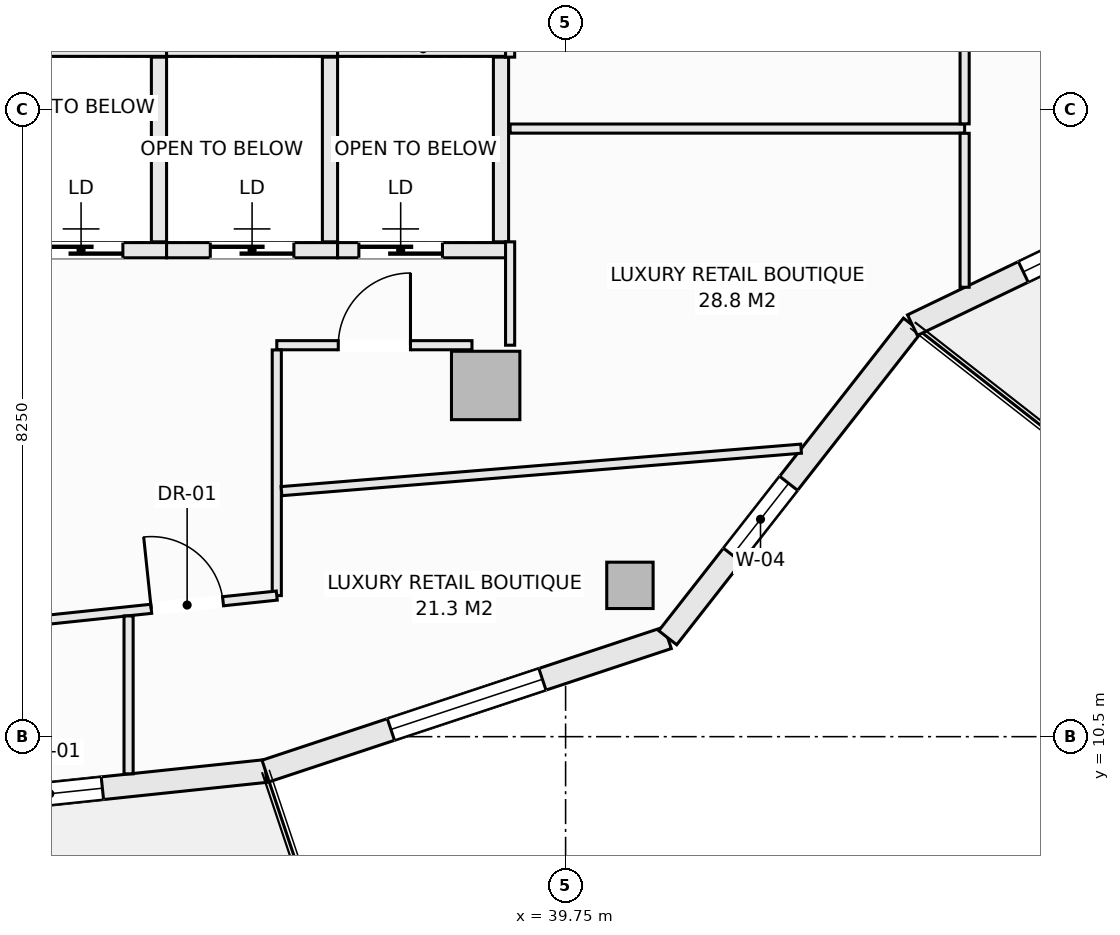
"""IFC4 building model, lengths in metres.
Left out: names, types, materials, properties, quantities, classifications, styles, units other than length and angle.
Written with IfcOpenShell. Run it as: python <this file> out.ifc"""

import sys

from ifc_helpers import new_model, si_unit, direction, frame, frame_2d, origin, origin_2d, place, context, subcontext, project, spatial, rectangle, hollow_rectangle, extrude, element, fill, save


model = new_model("IFC4")
c1 = context("Model", 3, precision=1e-05, world=origin(), true_north=direction((0.0, 1.0)))
c2 = subcontext(c1, "Body", "Model", "MODEL_VIEW")
j1 = project(units=[si_unit("LENGTHUNIT", "METRE"), si_unit("PLANEANGLEUNIT", "RADIAN")], contexts=[c1])
p1 = place(None, origin())
s1 = spatial("IfcSite", under=j1, at=p1, CompositionType="ELEMENT")
p2 = place(p1, origin())
s2 = spatial("IfcBuilding", under=s1, at=p2, CompositionType="ELEMENT")
p3 = place(p2, frame((0.0, 0.0, 166.5)))
s3 = spatial("IfcBuildingStorey", under=s2, at=p3, CompositionType="ELEMENT", Elevation=166.5)
p4 = place(p3, frame((40.596, 12.49, -0.27), z_axis=(0.0, 0.0, 1.0), x_axis=(1.0, 0.0, 0.0)))
e1 = element("IfcColumn", 1, at=p4, inside=s3, PredefinedType="COLUMN", context=c2, shape_type="SweptSolid", body=[
    extrude(hollow_rectangle(XDim=0.61, YDim=0.61, WallThickness=0.025, at=origin_2d()), origin(), (0.0, 0.0, 1.0), 3.4),
])
p5 = place(p3, frame((38.698, 15.121, -0.27), z_axis=(0.0, 0.0, 1.0), x_axis=(1.0, 0.0, 0.0)))
e2 = element("IfcColumn", 2, at=p5, inside=s3, PredefinedType="COLUMN", context=c2, shape_type="SweptSolid", body=[
    extrude(rectangle(XDim=0.9, YDim=0.9, at=origin_2d()), origin(), (0.0, 0.0, 1.0), 3.4),
])
p6 = place(p3, frame((30.125, 9.45, 0.0), z_axis=(0.0, 0.0, 1.0), x_axis=(0.994496545245, 0.104769372887, 0.0)))
e3 = element("IfcWall", 3, at=p6, inside=s3, PredefinedType="SOLIDWALL", context=c2, shape_type="SweptSolid", body=[
    extrude(rectangle(XDim=5.709, YDim=0.3, at=frame_2d((2.854, 0.0))), origin(), (0.0, 0.0, 1.0), 2.653),
])
p7 = place(p6, frame((1.45, 0.0, 0.74)))
e4 = element("IfcOpeningElement", 4, at=p7, cuts=e3, PredefinedType="OPENING", context=c2, shape_type="SweptSolid", body=[
    extrude(rectangle(XDim=2.1, YDim=1.7, at=frame_2d((1.05, 0.85))), frame((0.0, 0.16, 0.0), z_axis=(0.0, -1.0, 0.0), x_axis=(1.0, 0.0, 0.0)), (0.0, 0.0, 1.0), 0.32),
])
p8 = place(p3, frame((35.803, 10.048, 0.0), z_axis=(0.0, 0.0, 1.0), x_axis=(0.949246811547, 0.314532177636, 0.0)))
e5 = element("IfcWall", 5, at=p8, inside=s3, PredefinedType="SOLIDWALL", context=c2, shape_type="SweptSolid", body=[
    extrude(rectangle(XDim=5.574, YDim=0.3, at=frame_2d((2.787, 0.0))), origin(), (0.0, 0.0, 1.0), 2.653),
])
p9 = place(p8, frame((1.737, 0.0, 0.74)))
e6 = element("IfcOpeningElement", 6, at=p9, cuts=e5, PredefinedType="OPENING", context=c2, shape_type="SweptSolid", body=[
    extrude(rectangle(XDim=2.1, YDim=1.7, at=frame_2d((1.05, 0.85))), frame((0.0, 0.16, 0.0), z_axis=(0.0, -1.0, 0.0), x_axis=(1.0, 0.0, 0.0)), (0.0, 0.0, 1.0), 0.32),
])
p10 = place(p3, frame((41.094, 11.801, 0.0), z_axis=(0.0, 0.0, 1.0), x_axis=(0.616429245738, 0.787410302828, 0.0)))
e7 = element("IfcWall", 7, at=p10, inside=s3, PredefinedType="SOLIDWALL", context=c2, shape_type="SweptSolid", body=[
    extrude(rectangle(XDim=5.223, YDim=0.3, at=frame_2d((2.612, 0.0))), origin(), (0.0, 0.0, 1.0), 2.653),
])
p11 = place(p10, frame((1.38, 0.0, 0.72)))
e8 = element("IfcOpeningElement", 8, at=p11, cuts=e7, PredefinedType="OPENING", context=c2, shape_type="SweptSolid", body=[
    extrude(rectangle(XDim=1.2, YDim=1.65, at=frame_2d((0.6, 0.825))), frame((0.0, 0.16, 0.0), z_axis=(0.0, -1.0, 0.0), x_axis=(1.0, 0.0, 0.0)), (0.0, 0.0, 1.0), 0.32),
])
p12 = place(p3, frame((44.313, 15.914, 0.0), z_axis=(0.0, 0.0, 1.0), x_axis=(0.901353070301, 0.433085029363, 0.0)))
e9 = element("IfcWall", 9, at=p12, inside=s3, PredefinedType="SOLIDWALL", context=c2, shape_type="SweptSolid", body=[
    extrude(rectangle(XDim=5.336, YDim=0.3, at=frame_2d((2.668, 0.0))), origin(), (0.0, 0.0, 1.0), 2.653),
])
p13 = place(p12, frame((1.618, 0.0, 0.74)))
e10 = element("IfcOpeningElement", 10, at=p13, cuts=e9, PredefinedType="OPENING", context=c2, shape_type="SweptSolid", body=[
    extrude(rectangle(XDim=2.1, YDim=1.7, at=frame_2d((1.05, 0.85))), frame((0.0, 0.16, 0.0), z_axis=(0.0, -1.0, 0.0), x_axis=(1.0, 0.0, 0.0)), (0.0, 0.0, 1.0), 0.32),
])
p14 = place(p3, frame((32.25, 19.55, 0.0), z_axis=(0.0, 0.0, 1.0), x_axis=(1.0, 0.0, 0.0)))
e11 = element("IfcWall", 11, at=p14, inside=s3, PredefinedType="SOLIDWALL", context=c2, shape_type="SweptSolid", body=[
    extrude(rectangle(XDim=2.25, YDim=0.2, at=frame_2d((1.125, 0.0))), origin(), (0.0, 0.0, 1.0), 3.13),
])
p15 = place(p3, frame((32.25, 16.9, 0.0), z_axis=(0.0, 0.0, 1.0), x_axis=(1.0, 0.0, 0.0)))
e12 = element("IfcWall", 12, at=p15, inside=s3, PredefinedType="SOLIDWALL", context=c2, shape_type="SweptSolid", body=[
    extrude(rectangle(XDim=2.25, YDim=0.2, at=frame_2d((1.125, 0.0))), origin(), (0.0, 0.0, 1.0), 3.13),
])
p16 = place(p15, frame((0.575, 0.0, 0.0)))
e13 = element("IfcOpeningElement", 13, at=p16, cuts=e12, PredefinedType="OPENING", context=c2, shape_type="SweptSolid", body=[
    extrude(rectangle(XDim=1.1, YDim=2.2, at=frame_2d((0.55, 1.1))), frame((0.0, 0.11, 0.0), z_axis=(0.0, -1.0, 0.0), x_axis=(1.0, 0.0, 0.0)), (0.0, 0.0, 1.0), 0.22),
])
p17 = place(p3, frame((34.4, 17.01, 0.0), z_axis=(0.0, 0.0, 1.0), x_axis=(0.0, 1.0, 0.0)))
e14 = element("IfcWall", 14, at=p17, inside=s3, PredefinedType="SOLIDWALL", context=c2, shape_type="SweptSolid", body=[
    extrude(rectangle(XDim=2.43, YDim=0.2, at=frame_2d((1.215, 0.0))), origin(), (0.0, 0.0, 1.0), 3.13),
])
p18 = place(p3, frame((34.5, 19.55, 0.0), z_axis=(0.0, 0.0, 1.0), x_axis=(1.0, 0.0, 0.0)))
e15 = element("IfcWall", 15, at=p18, inside=s3, PredefinedType="SOLIDWALL", context=c2, shape_type="SweptSolid", body=[
    extrude(rectangle(XDim=2.25, YDim=0.2, at=frame_2d((1.125, 0.0))), origin(), (0.0, 0.0, 1.0), 3.13),
])
p19 = place(p3, frame((34.5, 16.9, 0.0), z_axis=(0.0, 0.0, 1.0), x_axis=(1.0, 0.0, 0.0)))
e16 = element("IfcWall", 16, at=p19, inside=s3, PredefinedType="SOLIDWALL", context=c2, shape_type="SweptSolid", body=[
    extrude(rectangle(XDim=2.25, YDim=0.2, at=frame_2d((1.125, 0.0))), origin(), (0.0, 0.0, 1.0), 3.13),
])
p20 = place(p19, frame((0.575, 0.0, 0.0)))
e17 = element("IfcOpeningElement", 17, at=p20, cuts=e16, PredefinedType="OPENING", context=c2, shape_type="SweptSolid", body=[
    extrude(rectangle(XDim=1.1, YDim=2.2, at=frame_2d((0.55, 1.1))), frame((0.0, 0.11, 0.0), z_axis=(0.0, -1.0, 0.0), x_axis=(1.0, 0.0, 0.0)), (0.0, 0.0, 1.0), 0.22),
])
p21 = place(p3, frame((36.65, 17.01, 0.0), z_axis=(0.0, 0.0, 1.0), x_axis=(0.0, 1.0, 0.0)))
e18 = element("IfcWall", 18, at=p21, inside=s3, PredefinedType="SOLIDWALL", context=c2, shape_type="SweptSolid", body=[
    extrude(rectangle(XDim=2.43, YDim=0.2, at=frame_2d((1.215, 0.0))), origin(), (0.0, 0.0, 1.0), 3.13),
])
p22 = place(p3, frame((36.75, 19.55, 0.0), z_axis=(0.0, 0.0, 1.0), x_axis=(1.0, 0.0, 0.0)))
e19 = element("IfcWall", 19, at=p22, inside=s3, PredefinedType="SOLIDWALL", context=c2, shape_type="SweptSolid", body=[
    extrude(rectangle(XDim=2.25, YDim=0.2, at=frame_2d((1.125, 0.0))), origin(), (0.0, 0.0, 1.0), 3.13),
])
p23 = place(p3, frame((36.75, 16.9, 0.0), z_axis=(0.0, 0.0, 1.0), x_axis=(1.0, 0.0, 0.0)))
e20 = element("IfcWall", 20, at=p23, inside=s3, PredefinedType="SOLIDWALL", context=c2, shape_type="SweptSolid", body=[
    extrude(rectangle(XDim=2.25, YDim=0.2, at=frame_2d((1.125, 0.0))), origin(), (0.0, 0.0, 1.0), 3.13),
])
p24 = place(p23, frame((0.28, 0.0, 0.0)))
e21 = element("IfcOpeningElement", 21, at=p24, cuts=e20, PredefinedType="OPENING", context=c2, shape_type="SweptSolid", body=[
    extrude(rectangle(XDim=1.1, YDim=2.2, at=frame_2d((0.55, 1.1))), frame((0.0, 0.11, 0.0), z_axis=(0.0, -1.0, 0.0), x_axis=(1.0, 0.0, 0.0)), (0.0, 0.0, 1.0), 0.22),
])
p25 = place(p3, frame((38.9, 17.01, 0.0), z_axis=(0.0, 0.0, 1.0), x_axis=(0.0, 1.0, 0.0)))
e22 = element("IfcWall", 22, at=p25, inside=s3, PredefinedType="SOLIDWALL", context=c2, shape_type="SweptSolid", body=[
    extrude(rectangle(XDim=2.43, YDim=0.2, at=frame_2d((1.215, 0.0))), origin(), (0.0, 0.0, 1.0), 3.13),
])
p26 = place(p3, frame((39.02, 15.65, 0.0), z_axis=(0.0, 0.0, 1.0), x_axis=(0.0, 1.0, 0.0)))
e23 = element("IfcWall", 23, at=p26, inside=s3, PredefinedType="PARTITIONING", context=c2, shape_type="SweptSolid", body=[
    extrude(rectangle(XDim=1.36, YDim=0.12, at=frame_2d((0.68, 0.0))), origin(), (0.0, 0.0, 1.0), 2.505),
])
p27 = place(p3, frame((39.02, 19.44, 0.0), z_axis=(0.0, 0.0, 1.0), x_axis=(0.0, 1.0, 0.0)))
e24 = element("IfcWall", 24, at=p27, inside=s3, PredefinedType="PARTITIONING", context=c2, shape_type="SweptSolid", body=[
    extrude(rectangle(XDim=0.92, YDim=0.12, at=frame_2d((0.46, 0.0))), origin(), (0.0, 0.0, 1.0), 3.13),
])
p28 = place(p3, frame((35.95, 15.65, 0.0), z_axis=(0.0, 0.0, 1.0), x_axis=(1.0, 0.0, 0.0)))
e25 = element("IfcWall", 25, at=p28, inside=s3, PredefinedType="PARTITIONING", context=c2, shape_type="SweptSolid", body=[
    extrude(rectangle(XDim=2.568, YDim=0.12, at=frame_2d((1.284, 0.0))), origin(), (0.0, 0.0, 1.0), 3.13),
])
p29 = place(p28, frame((0.809, 0.0, 0.0)))
e26 = element("IfcOpeningElement", 26, at=p29, cuts=e25, PredefinedType="OPENING", context=c2, shape_type="SweptSolid", body=[
    extrude(rectangle(XDim=0.95, YDim=2.1, at=frame_2d((0.475, 1.05))), frame((0.0, 0.07, 0.0), z_axis=(0.0, -1.0, 0.0), x_axis=(1.0, 0.0, 0.0)), (0.0, 0.0, 1.0), 0.14),
])
p30 = place(p3, frame((35.95, 12.356, 0.0), z_axis=(0.0, 0.0, 1.0), x_axis=(0.0, 1.0, 0.0)))
e27 = element("IfcWall", 27, at=p30, inside=s3, PredefinedType="PARTITIONING", context=c2, shape_type="SweptSolid", body=[
    extrude(rectangle(XDim=3.232, YDim=0.12, at=frame_2d((1.616, 0.0))), origin(), (0.0, 0.0, 1.0), 3.13),
])
p31 = place(p3, frame((30.195, 11.75, 0.0), z_axis=(0.0, 0.0, 1.0), x_axis=(0.994502215954, 0.104715531139, 0.0)))
e28 = element("IfcWall", 28, at=p31, inside=s3, PredefinedType="PARTITIONING", context=c2, shape_type="SweptSolid", body=[
    extrude(rectangle(XDim=5.787, YDim=0.12, at=frame_2d((2.893, 0.0))), origin(), (0.0, 0.0, 1.0), 3.13),
])
p32 = place(p31, frame((1.644, 0.0, 0.0)))
e29 = element("IfcOpeningElement", 29, at=p32, cuts=e28, PredefinedType="OPENING", context=c2, shape_type="SweptSolid", body=[
    extrude(rectangle(XDim=0.95, YDim=2.1, at=frame_2d((0.475, 1.05))), frame((0.0, 0.07, 0.0), z_axis=(0.0, -1.0, 0.0), x_axis=(1.0, 0.0, 0.0)), (0.0, 0.0, 1.0), 0.14),
])
p33 = place(p31, frame((4.126, 0.0, 0.0)))
e30 = element("IfcOpeningElement", 30, at=p33, cuts=e28, PredefinedType="OPENING", context=c2, shape_type="SweptSolid", body=[
    extrude(rectangle(XDim=0.95, YDim=2.1, at=frame_2d((0.475, 1.05))), frame((0.0, 0.07, 0.0), z_axis=(0.0, -1.0, 0.0), x_axis=(1.0, 0.0, 0.0)), (0.0, 0.0, 1.0), 0.14),
])
p34 = place(p3, frame((34.0, 10.011, 0.0), z_axis=(0.0, 0.0, 1.0), x_axis=(0.0, 1.0, 0.0)))
e31 = element("IfcWall", 31, at=p34, inside=s3, PredefinedType="PARTITIONING", context=c2, shape_type="SweptSolid", body=[
    extrude(rectangle(XDim=2.077, YDim=0.12, at=frame_2d((1.039, 0.0))), origin(), (0.0, 0.0, 1.0), 3.13),
])
p35 = place(p3, frame((36.012, 13.73, 0.0), z_axis=(0.0, 0.0, 1.0), x_axis=(0.9966727065, 0.081507767227, 0.0)))
e32 = element("IfcWall", 32, at=p35, inside=s3, PredefinedType="PARTITIONING", context=c2, shape_type="SweptSolid", body=[
    extrude(rectangle(XDim=6.859, YDim=0.12, at=frame_2d((3.43, 0.0))), origin(), (0.0, 0.0, 1.0), 2.653),
])
p36 = place(p3, frame((39.02, 18.5, 0.0), z_axis=(0.0, 0.0, 1.0), x_axis=(1.0, 0.0, 0.0)))
e33 = element("IfcWall", 33, at=p36, inside=s3, PredefinedType="PARTITIONING", context=c2, shape_type="SweptSolid", body=[
    extrude(rectangle(XDim=5.98, YDim=0.12, at=frame_2d((2.99, 0.0))), origin(), (0.0, 0.0, 1.0), 2.812),
])
p37 = place(p3, frame((45.0, 16.413, 0.0), z_axis=(0.0, 0.0, 1.0), x_axis=(0.0, 1.0, 0.0)))
e34 = element("IfcWall", 34, at=p37, inside=s3, PredefinedType="PARTITIONING", context=c2, shape_type="SweptSolid", body=[
    extrude(rectangle(XDim=2.025, YDim=0.12, at=frame_2d((1.013, 0.0))), origin(), (0.0, 0.0, 1.0), 3.13),
])
p38 = place(p3, frame((45.0, 18.562, 0.0), z_axis=(0.0, 0.0, 1.0), x_axis=(0.0, 1.0, 0.0)))
e35 = element("IfcWall", 35, at=p38, inside=s3, PredefinedType="PARTITIONING", context=c2, shape_type="SweptSolid", body=[
    extrude(rectangle(XDim=1.585, YDim=0.12, at=frame_2d((0.792, 0.0))), origin(), (0.0, 0.0, 1.0), 3.13),
])
p39 = place(p7, origin())
e36 = element("IfcWindow", 36, at=p39, inside=s3, PartitioningType="SINGLE_PANEL", PredefinedType="WINDOW", context=c2, shape_type="SweptSolid", body=[
    extrude(rectangle(XDim=2.1, YDim=1.7, at=frame_2d((1.05, 0.85))), frame((0.0, 0.03, 0.0), z_axis=(0.0, -1.0, 0.0), x_axis=(1.0, 0.0, 0.0)), (0.0, 0.0, 1.0), 0.06),
])
fill(e4, e36)
p40 = place(p9, origin())
e37 = element("IfcWindow", 37, at=p40, inside=s3, PartitioningType="SINGLE_PANEL", PredefinedType="WINDOW", context=c2, shape_type="SweptSolid", body=[
    extrude(rectangle(XDim=2.1, YDim=1.7, at=frame_2d((1.05, 0.85))), frame((0.0, 0.03, 0.0), z_axis=(0.0, -1.0, 0.0), x_axis=(1.0, 0.0, 0.0)), (0.0, 0.0, 1.0), 0.06),
])
fill(e6, e37)
p41 = place(p11, origin())
e38 = element("IfcWindow", 38, at=p41, inside=s3, PartitioningType="SINGLE_PANEL", PredefinedType="WINDOW", context=c2, shape_type="SweptSolid", body=[
    extrude(rectangle(XDim=1.2, YDim=1.65, at=frame_2d((0.6, 0.825))), frame((0.0, 0.03, 0.0), z_axis=(0.0, -1.0, 0.0), x_axis=(1.0, 0.0, 0.0)), (0.0, 0.0, 1.0), 0.06),
])
fill(e8, e38)
p42 = place(p13, origin())
e39 = element("IfcWindow", 39, at=p42, inside=s3, PartitioningType="SINGLE_PANEL", PredefinedType="WINDOW", context=c2, shape_type="SweptSolid", body=[
    extrude(rectangle(XDim=2.1, YDim=1.7, at=frame_2d((1.05, 0.85))), frame((0.0, 0.03, 0.0), z_axis=(0.0, -1.0, 0.0), x_axis=(1.0, 0.0, 0.0)), (0.0, 0.0, 1.0), 0.06),
])
fill(e10, e39)
p43 = place(p16, origin())
e40 = element("IfcDoor", 40, at=p43, inside=s3, OperationType="SLIDING_TO_LEFT", PredefinedType="DOOR", context=c2, shape_type="SweptSolid", body=[
    extrude(rectangle(XDim=1.1, YDim=2.2, at=frame_2d((0.55, 1.1))), frame((0.0, 0.025, 0.0), z_axis=(0.0, -1.0, 0.0), x_axis=(1.0, 0.0, 0.0)), (0.0, 0.0, 1.0), 0.05),
])
fill(e13, e40)
p44 = place(p20, origin())
e41 = element("IfcDoor", 41, at=p44, inside=s3, OperationType="SLIDING_TO_LEFT", PredefinedType="DOOR", context=c2, shape_type="SweptSolid", body=[
    extrude(rectangle(XDim=1.1, YDim=2.2, at=frame_2d((0.55, 1.1))), frame((0.0, 0.025, 0.0), z_axis=(0.0, -1.0, 0.0), x_axis=(1.0, 0.0, 0.0)), (0.0, 0.0, 1.0), 0.05),
])
fill(e17, e41)
p45 = place(p24, origin())
e42 = element("IfcDoor", 42, at=p45, inside=s3, OperationType="SLIDING_TO_LEFT", PredefinedType="DOOR", context=c2, shape_type="SweptSolid", body=[
    extrude(rectangle(XDim=1.1, YDim=2.2, at=frame_2d((0.55, 1.1))), frame((0.0, 0.025, 0.0), z_axis=(0.0, -1.0, 0.0), x_axis=(1.0, 0.0, 0.0)), (0.0, 0.0, 1.0), 0.05),
])
fill(e21, e42)
p46 = place(p33, origin())
e43 = element("IfcDoor", 43, at=p46, inside=s3, OperationType="SINGLE_SWING_LEFT", PredefinedType="DOOR", context=c2, shape_type="SweptSolid", body=[
    extrude(rectangle(XDim=0.95, YDim=2.1, at=frame_2d((0.475, 1.05))), frame((0.0, 0.025, 0.0), z_axis=(0.0, -1.0, 0.0), x_axis=(1.0, 0.0, 0.0)), (0.0, 0.0, 1.0), 0.05),
])
fill(e30, e43)
p47 = place(p29, origin())
e44 = element("IfcDoor", 44, at=p47, inside=s3, OperationType="SINGLE_SWING_RIGHT", PredefinedType="DOOR", context=c2, shape_type="SweptSolid", body=[
    extrude(rectangle(XDim=0.95, YDim=2.1, at=frame_2d((0.475, 1.05))), frame((0.0, 0.025, 0.0), z_axis=(0.0, -1.0, 0.0), x_axis=(1.0, 0.0, 0.0)), (0.0, 0.0, 1.0), 0.05),
])
fill(e26, e44)
save(model, sys.argv[1])
